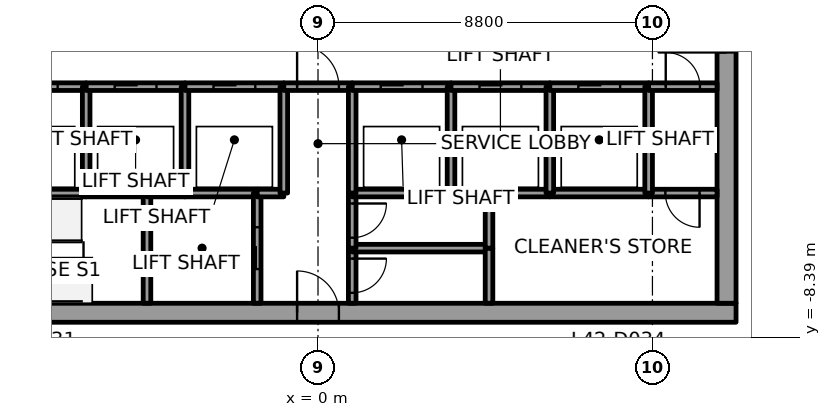
"""IFC4 building model, lengths in metres.
Left out: names, types, materials, properties, quantities, classifications, styles, units other than length and angle.
Written with IfcOpenShell. Run it as: python <this file> out.ifc"""

import sys

from ifc_helpers import new_model, si_unit, direction, frame, frame_2d, origin, place, context, subcontext, project, spatial, rectangle, extrude, element, fill, save


model = new_model("IFC4")
c1 = context("Model", 3, precision=1e-05, world=origin(), true_north=direction((0.0, 1.0)))
c2 = subcontext(c1, "Body", "Model", "MODEL_VIEW")
j1 = project(units=[si_unit("LENGTHUNIT", "METRE"), si_unit("PLANEANGLEUNIT", "RADIAN")], contexts=[c1])
p1 = place(None, origin())
s1 = spatial("IfcSite", under=j1, at=p1, CompositionType="ELEMENT")
p2 = place(p1, origin())
s2 = spatial("IfcBuilding", under=s1, at=p2, CompositionType="ELEMENT")
p3 = place(p2, frame((0.0, 0.0, 189.8)))
s3 = spatial("IfcBuildingStorey", under=s2, at=p3, CompositionType="ELEMENT", Elevation=189.8)
p4 = place(p3, frame((-11.0, -7.75, 0.0), z_axis=(0.0, 0.0, 1.0), x_axis=(1.0, 0.0, 0.0)))
e1 = element("IfcWall", 1, at=p4, inside=s3, PredefinedType="SHEAR", context=c2, shape_type="SweptSolid", body=[
    extrude(rectangle(XDim=22.0, YDim=0.5, at=frame_2d((11.0, 0.0))), origin(), (0.0, 0.0, 1.0), 4.0),
])
p5 = place(p4, frame((10.45, 0.0, 0.0)))
e2 = element("IfcOpeningElement", 2, at=p5, cuts=e1, PredefinedType="OPENING", context=c2, shape_type="SweptSolid", body=[
    extrude(rectangle(XDim=1.1, YDim=2.1, at=frame_2d((0.55, 1.05))), frame((0.0, 0.25, 0.0), z_axis=(0.0, -1.0, 0.0), x_axis=(1.0, 0.0, 0.0)), (0.0, 0.0, 1.0), 0.5),
])
p6 = place(p3, frame((10.75, -7.5, 0.0), z_axis=(0.0, 0.0, 1.0), x_axis=(0.0, 1.0, 0.0)))
e3 = element("IfcWall", 3, at=p6, inside=s3, PredefinedType="SHEAR", context=c2, shape_type="SweptSolid", body=[
    extrude(rectangle(XDim=15.0, YDim=0.5, at=frame_2d((7.5, 0.0))), origin(), (0.0, 0.0, 1.0), 4.0),
])
p7 = place(p6, frame((6.6, 0.0, 0.0)))
e4 = element("IfcOpeningElement", 4, at=p7, cuts=e3, PredefinedType="OPENING", context=c2, shape_type="SweptSolid", body=[
    extrude(rectangle(XDim=1.8, YDim=2.1, at=frame_2d((0.9, 1.05))), frame((0.0, 0.25, 0.0), z_axis=(0.0, -1.0, 0.0), x_axis=(1.0, 0.0, 0.0)), (0.0, 0.0, 1.0), 0.5),
])
p8 = place(p3, frame((-8.7, -4.6, 0.0), z_axis=(0.0, 0.0, 1.0), x_axis=(1.0, 0.0, 0.0)))
e5 = element("IfcWall", 5, at=p8, inside=s3, PredefinedType="SOLIDWALL", context=c2, shape_type="SweptSolid", body=[
    extrude(rectangle(XDim=2.6, YDim=0.2, at=frame_2d((1.3, 0.0))), origin(), (0.0, 0.0, 1.0), 3.85),
])
p9 = place(p3, frame((-8.7, -1.8, 0.0), z_axis=(0.0, 0.0, 1.0), x_axis=(1.0, 0.0, 0.0)))
e6 = element("IfcWall", 6, at=p9, inside=s3, PredefinedType="SOLIDWALL", context=c2, shape_type="SweptSolid", body=[
    extrude(rectangle(XDim=2.6, YDim=0.2, at=frame_2d((1.3, 0.0))), origin(), (0.0, 0.0, 1.0), 3.85),
])
p10 = place(p9, frame((0.75, 0.0, 0.0)))
e7 = element("IfcOpeningElement", 7, at=p10, cuts=e6, PredefinedType="OPENING", context=c2, shape_type="SweptSolid", body=[
    extrude(rectangle(XDim=1.1, YDim=2.1, at=frame_2d((0.55, 1.05))), frame((0.0, 0.1, 0.0), z_axis=(0.0, -1.0, 0.0), x_axis=(1.0, 0.0, 0.0)), (0.0, 0.0, 1.0), 0.2),
])
p11 = place(p3, frame((-6.1, -4.6, 0.0), z_axis=(0.0, 0.0, 1.0), x_axis=(1.0, 0.0, 0.0)))
e8 = element("IfcWall", 8, at=p11, inside=s3, PredefinedType="SOLIDWALL", context=c2, shape_type="SweptSolid", body=[
    extrude(rectangle(XDim=1.6, YDim=0.2, at=frame_2d((0.8, 0.0))), origin(), (0.0, 0.0, 1.0), 3.85),
])
p12 = place(p3, frame((-6.1, -4.6, 0.0), z_axis=(0.0, 0.0, 1.0), x_axis=(0.0, 1.0, 0.0)))
e9 = element("IfcWall", 9, at=p12, inside=s3, PredefinedType="SOLIDWALL", context=c2, shape_type="SweptSolid", body=[
    extrude(rectangle(XDim=2.8, YDim=0.2, at=frame_2d((1.4, 0.0))), origin(), (0.0, 0.0, 1.0), 3.85),
])
p13 = place(p3, frame((-6.1, -1.8, 0.0), z_axis=(0.0, 0.0, 1.0), x_axis=(1.0, 0.0, 0.0)))
e10 = element("IfcWall", 10, at=p13, inside=s3, PredefinedType="SOLIDWALL", context=c2, shape_type="SweptSolid", body=[
    extrude(rectangle(XDim=2.6, YDim=0.2, at=frame_2d((1.3, 0.0))), origin(), (0.0, 0.0, 1.0), 3.85),
])
p14 = place(p13, frame((0.75, 0.0, 0.0)))
e11 = element("IfcOpeningElement", 11, at=p14, cuts=e10, PredefinedType="OPENING", context=c2, shape_type="SweptSolid", body=[
    extrude(rectangle(XDim=1.1, YDim=2.1, at=frame_2d((0.55, 1.05))), frame((0.0, 0.1, 0.0), z_axis=(0.0, -1.0, 0.0), x_axis=(1.0, 0.0, 0.0)), (0.0, 0.0, 1.0), 0.2),
])
p15 = place(p3, frame((-4.5, -4.6, 0.0), z_axis=(0.0, 0.0, 1.0), x_axis=(0.0, -1.0, 0.0)))
e12 = element("IfcWall", 12, at=p15, inside=s3, PredefinedType="SOLIDWALL", context=c2, shape_type="SweptSolid", body=[
    extrude(rectangle(XDim=2.9, YDim=0.2, at=frame_2d((1.45, 0.0))), origin(), (0.0, 0.0, 1.0), 3.85),
])
p16 = place(p3, frame((-4.5, -4.6, 0.0), z_axis=(0.0, 0.0, 1.0), x_axis=(1.0, 0.0, 0.0)))
e13 = element("IfcWall", 13, at=p16, inside=s3, PredefinedType="SOLIDWALL", context=c2, shape_type="SweptSolid", body=[
    extrude(rectangle(XDim=1.0, YDim=0.2, at=frame_2d((0.5, 0.0))), origin(), (0.0, 0.0, 1.0), 3.85),
])
p17 = place(p3, frame((-3.5, -4.6, 0.0), z_axis=(0.0, 0.0, 1.0), x_axis=(1.0, 0.0, 0.0)))
e14 = element("IfcWall", 14, at=p17, inside=s3, PredefinedType="SOLIDWALL", context=c2, shape_type="SweptSolid", body=[
    extrude(rectangle(XDim=1.9, YDim=0.2, at=frame_2d((0.95, 0.0))), origin(), (0.0, 0.0, 1.0), 3.85),
])
p18 = place(p3, frame((-3.5, -4.6, 0.0), z_axis=(0.0, 0.0, 1.0), x_axis=(0.0, 1.0, 0.0)))
e15 = element("IfcWall", 15, at=p18, inside=s3, PredefinedType="SOLIDWALL", context=c2, shape_type="SweptSolid", body=[
    extrude(rectangle(XDim=2.8, YDim=0.2, at=frame_2d((1.4, 0.0))), origin(), (0.0, 0.0, 1.0), 3.85),
])
p19 = place(p3, frame((-3.5, -1.8, 0.0), z_axis=(0.0, 0.0, 1.0), x_axis=(1.0, 0.0, 0.0)))
e16 = element("IfcWall", 16, at=p19, inside=s3, PredefinedType="SOLIDWALL", context=c2, shape_type="SweptSolid", body=[
    extrude(rectangle(XDim=2.6, YDim=0.2, at=frame_2d((1.3, 0.0))), origin(), (0.0, 0.0, 1.0), 3.85),
])
p20 = place(p19, frame((0.75, 0.0, 0.0)))
e17 = element("IfcOpeningElement", 17, at=p20, cuts=e16, PredefinedType="OPENING", context=c2, shape_type="SweptSolid", body=[
    extrude(rectangle(XDim=1.1, YDim=2.1, at=frame_2d((0.55, 1.05))), frame((0.0, 0.1, 0.0), z_axis=(0.0, -1.0, 0.0), x_axis=(1.0, 0.0, 0.0)), (0.0, 0.0, 1.0), 0.2),
])
p21 = place(p3, frame((-1.6, -7.5, 0.0), z_axis=(0.0, 0.0, 1.0), x_axis=(0.0, 1.0, 0.0)))
e18 = element("IfcWall", 18, at=p21, inside=s3, PredefinedType="SOLIDWALL", context=c2, shape_type="SweptSolid", body=[
    extrude(rectangle(XDim=2.9, YDim=0.2, at=frame_2d((1.45, 0.0))), origin(), (0.0, 0.0, 1.0), 3.85),
])
p22 = place(p21, frame((0.9, 0.0, 0.0)))
e19 = element("IfcOpeningElement", 19, at=p22, cuts=e18, PredefinedType="OPENING", context=c2, shape_type="SweptSolid", body=[
    extrude(rectangle(XDim=1.1, YDim=2.1, at=frame_2d((0.55, 1.05))), frame((0.0, 0.1, 0.0), z_axis=(0.0, -1.0, 0.0), x_axis=(1.0, 0.0, 0.0)), (0.0, 0.0, 1.0), 0.2),
])
p23 = place(p3, frame((-1.6, -4.6, 0.0), z_axis=(0.0, 0.0, 1.0), x_axis=(1.0, 0.0, 0.0)))
e20 = element("IfcWall", 20, at=p23, inside=s3, PredefinedType="SOLIDWALL", context=c2, shape_type="SweptSolid", body=[
    extrude(rectangle(XDim=0.7, YDim=0.2, at=frame_2d((0.35, 0.0))), origin(), (0.0, 0.0, 1.0), 3.85),
])
p24 = place(p3, frame((-0.9, -4.6, 0.0), z_axis=(0.0, 0.0, 1.0), x_axis=(0.0, 1.0, 0.0)))
e21 = element("IfcWall", 21, at=p24, inside=s3, PredefinedType="SOLIDWALL", context=c2, shape_type="SweptSolid", body=[
    extrude(rectangle(XDim=2.8, YDim=0.2, at=frame_2d((1.4, 0.0))), origin(), (0.0, 0.0, 1.0), 3.85),
])
p25 = place(p3, frame((-0.9, -1.8, 0.0), z_axis=(0.0, 0.0, 1.0), x_axis=(1.0, 0.0, 0.0)))
e22 = element("IfcWall", 22, at=p25, inside=s3, PredefinedType="SOLIDWALL", context=c2, shape_type="SweptSolid", body=[
    extrude(rectangle(XDim=1.8, YDim=0.2, at=frame_2d((0.9, 0.0))), origin(), (0.0, 0.0, 1.0), 3.85),
])
p26 = place(p25, frame((0.35, 0.0, 0.0)))
e23 = element("IfcOpeningElement", 23, at=p26, cuts=e22, PredefinedType="OPENING", context=c2, shape_type="SweptSolid", body=[
    extrude(rectangle(XDim=1.1, YDim=2.1, at=frame_2d((0.55, 1.05))), frame((0.0, 0.1, 0.0), z_axis=(0.0, -1.0, 0.0), x_axis=(1.0, 0.0, 0.0)), (0.0, 0.0, 1.0), 0.2),
])
p27 = place(p3, frame((0.9, -6.05, 0.0), z_axis=(0.0, 0.0, 1.0), x_axis=(0.0, -1.0, 0.0)))
e24 = element("IfcWall", 24, at=p27, inside=s3, PredefinedType="SOLIDWALL", context=c2, shape_type="SweptSolid", body=[
    extrude(rectangle(XDim=1.45, YDim=0.2, at=frame_2d((0.725, 0.0))), origin(), (0.0, 0.0, 1.0), 3.85),
])
p28 = place(p27, frame((0.275, 0.0, 0.0)))
e25 = element("IfcOpeningElement", 25, at=p28, cuts=e24, PredefinedType="OPENING", context=c2, shape_type="SweptSolid", body=[
    extrude(rectangle(XDim=0.9, YDim=2.1, at=frame_2d((0.45, 1.05))), frame((0.0, 0.1, 0.0), z_axis=(0.0, -1.0, 0.0), x_axis=(1.0, 0.0, 0.0)), (0.0, 0.0, 1.0), 0.2),
])
p29 = place(p3, frame((4.5, -6.05, 0.0), z_axis=(0.0, 0.0, 1.0), x_axis=(-1.0, 0.0, 0.0)))
e26 = element("IfcWall", 26, at=p29, inside=s3, PredefinedType="SOLIDWALL", context=c2, shape_type="SweptSolid", body=[
    extrude(rectangle(XDim=3.6, YDim=0.2, at=frame_2d((1.8, 0.0))), origin(), (0.0, 0.0, 1.0), 3.85),
])
p30 = place(p3, frame((0.9, -4.6, 0.0), z_axis=(0.0, 0.0, 1.0), x_axis=(0.0, -1.0, 0.0)))
e27 = element("IfcWall", 27, at=p30, inside=s3, PredefinedType="SOLIDWALL", context=c2, shape_type="SweptSolid", body=[
    extrude(rectangle(XDim=1.45, YDim=0.2, at=frame_2d((0.725, 0.0))), origin(), (0.0, 0.0, 1.0), 3.85),
])
p31 = place(p30, frame((0.275, 0.0, 0.0)))
e28 = element("IfcOpeningElement", 28, at=p31, cuts=e27, PredefinedType="OPENING", context=c2, shape_type="SweptSolid", body=[
    extrude(rectangle(XDim=0.9, YDim=2.1, at=frame_2d((0.45, 1.05))), frame((0.0, 0.1, 0.0), z_axis=(0.0, -1.0, 0.0), x_axis=(1.0, 0.0, 0.0)), (0.0, 0.0, 1.0), 0.2),
])
p32 = place(p3, frame((3.5, -4.6, 0.0), z_axis=(0.0, 0.0, 1.0), x_axis=(-1.0, 0.0, 0.0)))
e29 = element("IfcWall", 29, at=p32, inside=s3, PredefinedType="SOLIDWALL", context=c2, shape_type="SweptSolid", body=[
    extrude(rectangle(XDim=2.6, YDim=0.2, at=frame_2d((1.3, 0.0))), origin(), (0.0, 0.0, 1.0), 3.85),
])
p33 = place(p3, frame((0.9, -1.8, 0.0), z_axis=(0.0, 0.0, 1.0), x_axis=(0.0, -1.0, 0.0)))
e30 = element("IfcWall", 30, at=p33, inside=s3, PredefinedType="SOLIDWALL", context=c2, shape_type="SweptSolid", body=[
    extrude(rectangle(XDim=2.8, YDim=0.2, at=frame_2d((1.4, 0.0))), origin(), (0.0, 0.0, 1.0), 3.85),
])
p34 = place(p3, frame((0.9, -1.8, 0.0), z_axis=(0.0, 0.0, 1.0), x_axis=(1.0, 0.0, 0.0)))
e31 = element("IfcWall", 31, at=p34, inside=s3, PredefinedType="SOLIDWALL", context=c2, shape_type="SweptSolid", body=[
    extrude(rectangle(XDim=2.6, YDim=0.2, at=frame_2d((1.3, 0.0))), origin(), (0.0, 0.0, 1.0), 3.85),
])
p35 = place(p34, frame((0.75, 0.0, 0.0)))
e32 = element("IfcOpeningElement", 32, at=p35, cuts=e31, PredefinedType="OPENING", context=c2, shape_type="SweptSolid", body=[
    extrude(rectangle(XDim=1.1, YDim=2.1, at=frame_2d((0.55, 1.05))), frame((0.0, 0.1, 0.0), z_axis=(0.0, -1.0, 0.0), x_axis=(1.0, 0.0, 0.0)), (0.0, 0.0, 1.0), 0.2),
])
p36 = place(p3, frame((4.5, -4.6, 0.0), z_axis=(0.0, 0.0, 1.0), x_axis=(-1.0, 0.0, 0.0)))
e33 = element("IfcWall", 33, at=p36, inside=s3, PredefinedType="SOLIDWALL", context=c2, shape_type="SweptSolid", body=[
    extrude(rectangle(XDim=1.0, YDim=0.2, at=frame_2d((0.5, 0.0))), origin(), (0.0, 0.0, 1.0), 3.85),
])
p37 = place(p3, frame((3.5, -4.6, 0.0), z_axis=(0.0, 0.0, 1.0), x_axis=(0.0, 1.0, 0.0)))
e34 = element("IfcWall", 34, at=p37, inside=s3, PredefinedType="SOLIDWALL", context=c2, shape_type="SweptSolid", body=[
    extrude(rectangle(XDim=2.8, YDim=0.2, at=frame_2d((1.4, 0.0))), origin(), (0.0, 0.0, 1.0), 3.85),
])
p38 = place(p3, frame((3.5, -1.8, 0.0), z_axis=(0.0, 0.0, 1.0), x_axis=(1.0, 0.0, 0.0)))
e35 = element("IfcWall", 35, at=p38, inside=s3, PredefinedType="SOLIDWALL", context=c2, shape_type="SweptSolid", body=[
    extrude(rectangle(XDim=2.6, YDim=0.2, at=frame_2d((1.3, 0.0))), origin(), (0.0, 0.0, 1.0), 3.85),
])
p39 = place(p38, frame((0.75, 0.0, 0.0)))
e36 = element("IfcOpeningElement", 36, at=p39, cuts=e35, PredefinedType="OPENING", context=c2, shape_type="SweptSolid", body=[
    extrude(rectangle(XDim=1.1, YDim=2.1, at=frame_2d((0.55, 1.05))), frame((0.0, 0.1, 0.0), z_axis=(0.0, -1.0, 0.0), x_axis=(1.0, 0.0, 0.0)), (0.0, 0.0, 1.0), 0.2),
])
for number, where, z_axis, x_axis in (
    (37, (4.5, -6.05, 0.0), (0.0, 0.0, 1.0), (0.0, -1.0, 0.0)),
    (38, (4.5, -4.6, 0.0), (0.0, 0.0, 1.0), (0.0, -1.0, 0.0)),
):
    element("IfcWall", number, at=place(p3, frame(where, z_axis=z_axis, x_axis=x_axis)), inside=s3, PredefinedType="SOLIDWALL", context=c2, shape_type="SweptSolid", body=[
        extrude(rectangle(XDim=1.45, YDim=0.2, at=frame_2d((0.725, 0.0))), origin(), (0.0, 0.0, 1.0), 3.85),
    ])
p40 = place(p3, frame((6.1, -4.6, 0.0), z_axis=(0.0, 0.0, 1.0), x_axis=(-1.0, 0.0, 0.0)))
e39 = element("IfcWall", 39, at=p40, inside=s3, PredefinedType="SOLIDWALL", context=c2, shape_type="SweptSolid", body=[
    extrude(rectangle(XDim=1.6, YDim=0.2, at=frame_2d((0.8, 0.0))), origin(), (0.0, 0.0, 1.0), 3.85),
])
p41 = place(p3, frame((8.7, -4.6, 0.0), z_axis=(0.0, 0.0, 1.0), x_axis=(-1.0, 0.0, 0.0)))
e40 = element("IfcWall", 40, at=p41, inside=s3, PredefinedType="SOLIDWALL", context=c2, shape_type="SweptSolid", body=[
    extrude(rectangle(XDim=2.6, YDim=0.2, at=frame_2d((1.3, 0.0))), origin(), (0.0, 0.0, 1.0), 3.85),
])
p42 = place(p3, frame((6.1, -4.6, 0.0), z_axis=(0.0, 0.0, 1.0), x_axis=(0.0, 1.0, 0.0)))
e41 = element("IfcWall", 41, at=p42, inside=s3, PredefinedType="SOLIDWALL", context=c2, shape_type="SweptSolid", body=[
    extrude(rectangle(XDim=2.8, YDim=0.2, at=frame_2d((1.4, 0.0))), origin(), (0.0, 0.0, 1.0), 3.85),
])
p43 = place(p3, frame((6.1, -1.8, 0.0), z_axis=(0.0, 0.0, 1.0), x_axis=(1.0, 0.0, 0.0)))
e42 = element("IfcWall", 42, at=p43, inside=s3, PredefinedType="SOLIDWALL", context=c2, shape_type="SweptSolid", body=[
    extrude(rectangle(XDim=2.6, YDim=0.2, at=frame_2d((1.3, 0.0))), origin(), (0.0, 0.0, 1.0), 3.85),
])
p44 = place(p43, frame((0.75, 0.0, 0.0)))
e43 = element("IfcOpeningElement", 43, at=p44, cuts=e42, PredefinedType="OPENING", context=c2, shape_type="SweptSolid", body=[
    extrude(rectangle(XDim=1.1, YDim=2.1, at=frame_2d((0.55, 1.05))), frame((0.0, 0.1, 0.0), z_axis=(0.0, -1.0, 0.0), x_axis=(1.0, 0.0, 0.0)), (0.0, 0.0, 1.0), 0.2),
])
p45 = place(p3, frame((10.5, -4.6, 0.0), z_axis=(0.0, 0.0, 1.0), x_axis=(-1.0, 0.0, 0.0)))
e44 = element("IfcWall", 44, at=p45, inside=s3, PredefinedType="SOLIDWALL", context=c2, shape_type="SweptSolid", body=[
    extrude(rectangle(XDim=1.8, YDim=0.2, at=frame_2d((0.9, 0.0))), origin(), (0.0, 0.0, 1.0), 3.85),
])
p46 = place(p45, frame((0.46, 0.0, 0.0)))
e45 = element("IfcOpeningElement", 45, at=p46, cuts=e44, PredefinedType="OPENING", context=c2, shape_type="SweptSolid", body=[
    extrude(rectangle(XDim=0.9, YDim=2.1, at=frame_2d((0.45, 1.05))), frame((0.0, 0.1, 0.0), z_axis=(0.0, -1.0, 0.0), x_axis=(1.0, 0.0, 0.0)), (0.0, 0.0, 1.0), 0.2),
])
p47 = place(p3, frame((8.7, -1.8, 0.0), z_axis=(0.0, 0.0, 1.0), x_axis=(0.0, -1.0, 0.0)))
e46 = element("IfcWall", 46, at=p47, inside=s3, PredefinedType="SOLIDWALL", context=c2, shape_type="SweptSolid", body=[
    extrude(rectangle(XDim=2.8, YDim=0.2, at=frame_2d((1.4, 0.0))), origin(), (0.0, 0.0, 1.0), 3.85),
])
p48 = place(p3, frame((8.7, -1.8, 0.0), z_axis=(0.0, 0.0, 1.0), x_axis=(1.0, 0.0, 0.0)))
e47 = element("IfcWall", 47, at=p48, inside=s3, PredefinedType="SOLIDWALL", context=c2, shape_type="SweptSolid", body=[
    extrude(rectangle(XDim=1.8, YDim=0.2, at=frame_2d((0.9, 0.0))), origin(), (0.0, 0.0, 1.0), 3.85),
])
p49 = place(p48, frame((0.45, 0.0, 0.0)))
e48 = element("IfcOpeningElement", 48, at=p49, cuts=e47, PredefinedType="OPENING", context=c2, shape_type="SweptSolid", body=[
    extrude(rectangle(XDim=0.9, YDim=2.1, at=frame_2d((0.45, 1.05))), frame((0.0, 0.1, 0.0), z_axis=(0.0, -1.0, 0.0), x_axis=(1.0, 0.0, 0.0)), (0.0, 0.0, 1.0), 0.2),
])
p50 = place(p10, origin())
e49 = element("IfcDoor", 49, at=p50, inside=s3, OperationType="SLIDING_TO_LEFT", PredefinedType="DOOR", context=c2, shape_type="SweptSolid", body=[
    extrude(rectangle(XDim=1.1, YDim=2.1, at=frame_2d((0.55, 1.05))), frame((0.0, 0.025, 0.0), z_axis=(0.0, -1.0, 0.0), x_axis=(1.0, 0.0, 0.0)), (0.0, 0.0, 1.0), 0.05),
])
fill(e7, e49)
p51 = place(p14, origin())
e50 = element("IfcDoor", 50, at=p51, inside=s3, OperationType="SLIDING_TO_RIGHT", PredefinedType="DOOR", context=c2, shape_type="SweptSolid", body=[
    extrude(rectangle(XDim=1.1, YDim=2.1, at=frame_2d((0.55, 1.05))), frame((0.0, 0.025, 0.0), z_axis=(0.0, -1.0, 0.0), x_axis=(1.0, 0.0, 0.0)), (0.0, 0.0, 1.0), 0.05),
])
fill(e11, e50)
p52 = place(p20, origin())
e51 = element("IfcDoor", 51, at=p52, inside=s3, OperationType="SLIDING_TO_RIGHT", PredefinedType="DOOR", context=c2, shape_type="SweptSolid", body=[
    extrude(rectangle(XDim=1.1, YDim=2.1, at=frame_2d((0.55, 1.05))), frame((0.0, 0.025, 0.0), z_axis=(0.0, -1.0, 0.0), x_axis=(1.0, 0.0, 0.0)), (0.0, 0.0, 1.0), 0.05),
])
fill(e17, e51)
p53 = place(p35, origin())
e52 = element("IfcDoor", 52, at=p53, inside=s3, OperationType="SLIDING_TO_LEFT", PredefinedType="DOOR", context=c2, shape_type="SweptSolid", body=[
    extrude(rectangle(XDim=1.1, YDim=2.1, at=frame_2d((0.55, 1.05))), frame((0.0, 0.025, 0.0), z_axis=(0.0, -1.0, 0.0), x_axis=(1.0, 0.0, 0.0)), (0.0, 0.0, 1.0), 0.05),
])
fill(e32, e52)
p54 = place(p39, origin())
e53 = element("IfcDoor", 53, at=p54, inside=s3, OperationType="SLIDING_TO_LEFT", PredefinedType="DOOR", context=c2, shape_type="SweptSolid", body=[
    extrude(rectangle(XDim=1.1, YDim=2.1, at=frame_2d((0.55, 1.05))), frame((0.0, 0.025, 0.0), z_axis=(0.0, -1.0, 0.0), x_axis=(1.0, 0.0, 0.0)), (0.0, 0.0, 1.0), 0.05),
])
fill(e36, e53)
p55 = place(p44, origin())
e54 = element("IfcDoor", 54, at=p55, inside=s3, OperationType="SLIDING_TO_RIGHT", PredefinedType="DOOR", context=c2, shape_type="SweptSolid", body=[
    extrude(rectangle(XDim=1.1, YDim=2.1, at=frame_2d((0.55, 1.05))), frame((0.0, 0.025, 0.0), z_axis=(0.0, -1.0, 0.0), x_axis=(1.0, 0.0, 0.0)), (0.0, 0.0, 1.0), 0.05),
])
fill(e43, e54)
p56 = place(p22, origin())
e55 = element("IfcDoor", 55, at=p56, inside=s3, OperationType="SLIDING_TO_RIGHT", PredefinedType="DOOR", context=c2, shape_type="SweptSolid", body=[
    extrude(rectangle(XDim=1.1, YDim=2.1, at=frame_2d((0.55, 1.05))), frame((0.0, 0.025, 0.0), z_axis=(0.0, -1.0, 0.0), x_axis=(1.0, 0.0, 0.0)), (0.0, 0.0, 1.0), 0.05),
])
fill(e19, e55)
p57 = place(p26, origin())
e56 = element("IfcDoor", 56, at=p57, inside=s3, OperationType="SINGLE_SWING_RIGHT", PredefinedType="DOOR", context=c2, shape_type="SweptSolid", body=[
    extrude(rectangle(XDim=1.1, YDim=2.1, at=frame_2d((0.55, 1.05))), frame((0.0, 0.025, 0.0), z_axis=(0.0, -1.0, 0.0), x_axis=(1.0, 0.0, 0.0)), (0.0, 0.0, 1.0), 0.05),
])
fill(e23, e56)
p58 = place(p46, origin())
e57 = element("IfcDoor", 57, at=p58, inside=s3, OperationType="SINGLE_SWING_LEFT", PredefinedType="DOOR", context=c2, shape_type="SweptSolid", body=[
    extrude(rectangle(XDim=0.9, YDim=2.1, at=frame_2d((0.45, 1.05))), frame((0.0, 0.025, 0.0), z_axis=(0.0, -1.0, 0.0), x_axis=(1.0, 0.0, 0.0)), (0.0, 0.0, 1.0), 0.05),
])
fill(e45, e57)
p59 = place(p49, origin())
e58 = element("IfcDoor", 58, at=p59, inside=s3, OperationType="SINGLE_SWING_LEFT", PredefinedType="DOOR", context=c2, shape_type="SweptSolid", body=[
    extrude(rectangle(XDim=0.9, YDim=2.1, at=frame_2d((0.45, 1.05))), frame((0.0, 0.025, 0.0), z_axis=(0.0, -1.0, 0.0), x_axis=(1.0, 0.0, 0.0)), (0.0, 0.0, 1.0), 0.05),
])
fill(e48, e58)
p60 = place(p28, origin())
e59 = element("IfcDoor", 59, at=p60, inside=s3, OperationType="SINGLE_SWING_LEFT", PredefinedType="DOOR", context=c2, shape_type="SweptSolid", body=[
    extrude(rectangle(XDim=0.9, YDim=2.1, at=frame_2d((0.45, 1.05))), frame((0.0, 0.025, 0.0), z_axis=(0.0, -1.0, 0.0), x_axis=(1.0, 0.0, 0.0)), (0.0, 0.0, 1.0), 0.05),
])
fill(e25, e59)
p61 = place(p31, origin())
e60 = element("IfcDoor", 60, at=p61, inside=s3, OperationType="SINGLE_SWING_RIGHT", PredefinedType="DOOR", context=c2, shape_type="SweptSolid", body=[
    extrude(rectangle(XDim=0.9, YDim=2.1, at=frame_2d((0.45, 1.05))), frame((0.0, 0.025, 0.0), z_axis=(0.0, -1.0, 0.0), x_axis=(1.0, 0.0, 0.0)), (0.0, 0.0, 1.0), 0.05),
])
fill(e28, e60)
p62 = place(p7, origin())
e61 = element("IfcDoor", 61, at=p62, inside=s3, OperationType="DOUBLE_DOOR_SINGLE_SWING", PredefinedType="DOOR", context=c2, shape_type="SweptSolid", body=[
    extrude(rectangle(XDim=1.8, YDim=2.1, at=frame_2d((0.9, 1.05))), frame((0.0, 0.025, 0.0), z_axis=(0.0, -1.0, 0.0), x_axis=(1.0, 0.0, 0.0)), (0.0, 0.0, 1.0), 0.05),
])
fill(e4, e61)
p63 = place(p5, origin())
e62 = element("IfcDoor", 62, at=p63, inside=s3, OperationType="SINGLE_SWING_RIGHT", PredefinedType="DOOR", context=c2, shape_type="SweptSolid", body=[
    extrude(rectangle(XDim=1.1, YDim=2.1, at=frame_2d((0.55, 1.05))), frame((0.0, 0.025, 0.0), z_axis=(0.0, -1.0, 0.0), x_axis=(1.0, 0.0, 0.0)), (0.0, 0.0, 1.0), 0.05),
])
fill(e2, e62)
save(model, sys.argv[1])
